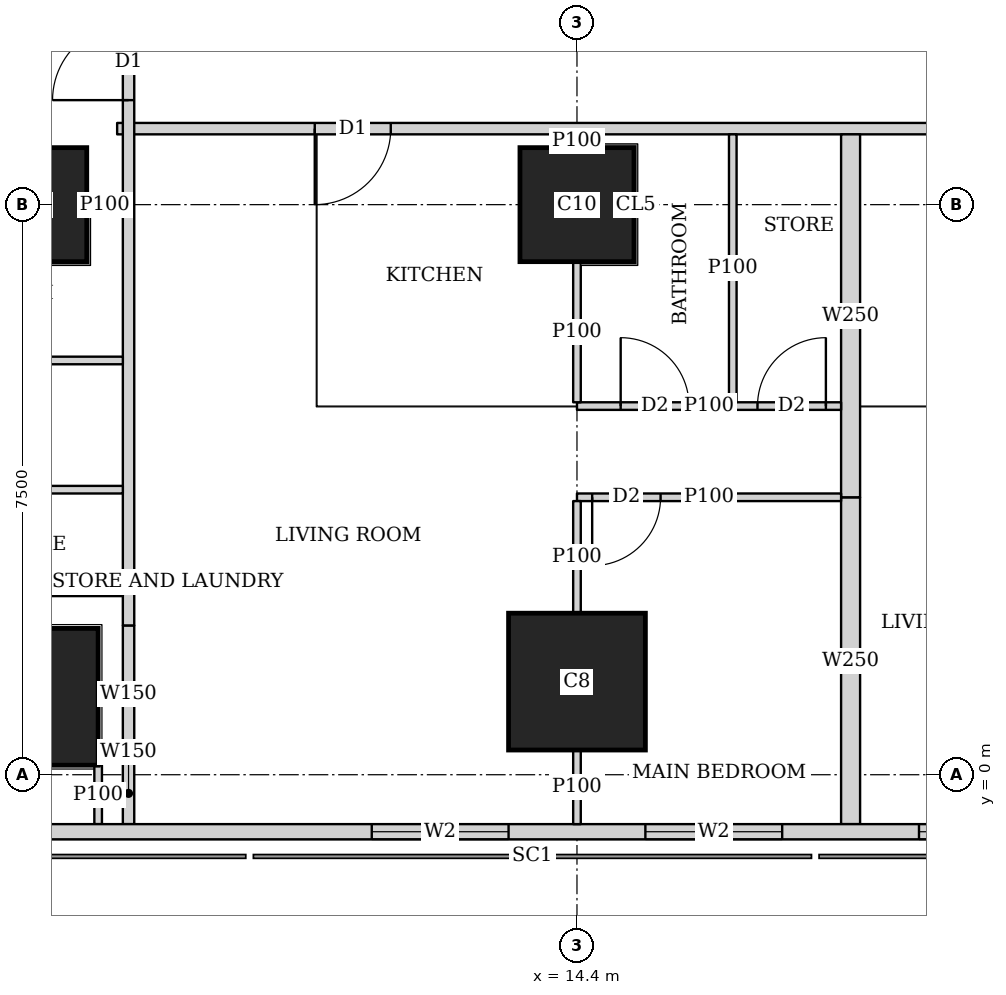
"""IFC4 building model, lengths in metres.
Left out: names, types, materials, properties, quantities, classifications, styles, units other than length and angle.
Written with IfcOpenShell. Run it as: python <this file> out.ifc"""

import sys

from ifc_helpers import new_model, si_unit, direction, frame, frame_2d, origin, origin_2d, place, context, subcontext, project, spatial, rectangle, extrude, element, fill, save


model = new_model("IFC4")
c1 = context("Model", 3, precision=1e-05, world=origin(), true_north=direction((0.0, 1.0)))
c2 = subcontext(c1, "Body", "Model", "MODEL_VIEW")
j1 = project(units=[si_unit("LENGTHUNIT", "METRE"), si_unit("PLANEANGLEUNIT", "RADIAN")], contexts=[c1])
p1 = place(None, origin())
s1 = spatial("IfcSite", under=j1, at=p1, CompositionType="ELEMENT")
p2 = place(p1, origin())
s2 = spatial("IfcBuilding", under=s1, at=p2, CompositionType="ELEMENT")
p3 = place(p2, frame((0.0, 0.0, 139.55)))
s3 = spatial("IfcBuildingStorey", under=s2, at=p3, CompositionType="ELEMENT", Elevation=139.55)
for number, where, z_axis, x_axis in (
    (1, (7.2, 1.025, 0.0), (0.0, 0.0, 1.0), (1.0, 0.0, 0.0)),
    (2, (14.4, 1.225, 0.0), (0.0, 0.0, 1.0), (1.0, 0.0, 0.0)),
):
    element("IfcColumn", number, at=place(p3, frame(where, z_axis=z_axis, x_axis=x_axis)), inside=s3, PredefinedType="COLUMN", context=c2, shape_type="SweptSolid", body=[
        extrude(rectangle(XDim=1.8, YDim=1.8, at=origin_2d()), origin(), (0.0, 0.0, 1.0), 3.75),
    ])
for number, where, z_axis, x_axis in (
    (3, (7.2, 7.5, 0.0), (0.0, 0.0, 1.0), (1.0, 0.0, 0.0)),
    (4, (14.4, 7.5, 0.0), (0.0, 0.0, 1.0), (1.0, 0.0, 0.0)),
):
    element("IfcColumn", number, at=place(p3, frame(where, z_axis=z_axis, x_axis=x_axis)), inside=s3, PredefinedType="COLUMN", context=c2, shape_type="SweptSolid", body=[
        extrude(rectangle(XDim=1.5, YDim=1.5, at=origin_2d()), origin(), (0.0, 0.0, 1.0), 3.75),
    ])
p4 = place(p3, frame((2.163, -0.75, 0.0), z_axis=(0.0, 0.0, 1.0), x_axis=(1.0, 0.0, 0.0)))
e5 = element("IfcWall", 5, at=p4, inside=s3, PredefinedType="SOLIDWALL", context=c2, shape_type="SweptSolid", body=[
    extrude(rectangle(XDim=45.628, YDim=0.2, at=frame_2d((22.814, 0.0))), origin(), (0.0, 0.0, 1.0), 3.5),
])
p5 = place(p4, frame((9.537, 0.0, 0.9)))
e6 = element("IfcOpeningElement", 6, at=p5, cuts=e5, PredefinedType="OPENING", context=c2, shape_type="SweptSolid", body=[
    extrude(rectangle(XDim=1.8, YDim=1.5, at=frame_2d((0.9, 0.75))), frame((0.0, 0.11, 0.0), z_axis=(0.0, -1.0, 0.0), x_axis=(1.0, 0.0, 0.0)), (0.0, 0.0, 1.0), 0.22),
])
p6 = place(p4, frame((13.137, 0.0, 0.9)))
e7 = element("IfcOpeningElement", 7, at=p6, cuts=e5, PredefinedType="OPENING", context=c2, shape_type="SweptSolid", body=[
    extrude(rectangle(XDim=1.8, YDim=1.5, at=frame_2d((0.9, 0.75))), frame((0.0, 0.11, 0.0), z_axis=(0.0, -1.0, 0.0), x_axis=(1.0, 0.0, 0.0)), (0.0, 0.0, 1.0), 0.22),
])
p7 = place(p4, frame((16.737, 0.0, 0.9)))
e8 = element("IfcOpeningElement", 8, at=p7, cuts=e5, PredefinedType="OPENING", context=c2, shape_type="SweptSolid", body=[
    extrude(rectangle(XDim=1.8, YDim=1.5, at=frame_2d((0.9, 0.75))), frame((0.0, 0.11, 0.0), z_axis=(0.0, -1.0, 0.0), x_axis=(1.0, 0.0, 0.0)), (0.0, 0.0, 1.0), 0.22),
])
p8 = place(p4, frame((20.337, 0.0, 0.9)))
e9 = element("IfcOpeningElement", 9, at=p8, cuts=e5, PredefinedType="OPENING", context=c2, shape_type="SweptSolid", body=[
    extrude(rectangle(XDim=1.8, YDim=1.5, at=frame_2d((0.9, 0.75))), frame((0.0, 0.11, 0.0), z_axis=(0.0, -1.0, 0.0), x_axis=(1.0, 0.0, 0.0)), (0.0, 0.0, 1.0), 0.22),
])
p9 = place(p4, frame((23.937, 0.0, 0.9)))
e10 = element("IfcOpeningElement", 10, at=p9, cuts=e5, PredefinedType="OPENING", context=c2, shape_type="SweptSolid", body=[
    extrude(rectangle(XDim=1.8, YDim=1.5, at=frame_2d((0.9, 0.75))), frame((0.0, 0.11, 0.0), z_axis=(0.0, -1.0, 0.0), x_axis=(1.0, 0.0, 0.0)), (0.0, 0.0, 1.0), 0.22),
])
p10 = place(p4, frame((27.537, 0.0, 0.9)))
e11 = element("IfcOpeningElement", 11, at=p10, cuts=e5, PredefinedType="OPENING", context=c2, shape_type="SweptSolid", body=[
    extrude(rectangle(XDim=1.8, YDim=1.5, at=frame_2d((0.9, 0.75))), frame((0.0, 0.11, 0.0), z_axis=(0.0, -1.0, 0.0), x_axis=(1.0, 0.0, 0.0)), (0.0, 0.0, 1.0), 0.22),
])
p11 = place(p4, frame((31.137, 0.0, 0.9)))
e12 = element("IfcOpeningElement", 12, at=p11, cuts=e5, PredefinedType="OPENING", context=c2, shape_type="SweptSolid", body=[
    extrude(rectangle(XDim=1.8, YDim=1.5, at=frame_2d((0.9, 0.75))), frame((0.0, 0.11, 0.0), z_axis=(0.0, -1.0, 0.0), x_axis=(1.0, 0.0, 0.0)), (0.0, 0.0, 1.0), 0.22),
])
p12 = place(p4, frame((34.737, 0.0, 0.9)))
e13 = element("IfcOpeningElement", 13, at=p12, cuts=e5, PredefinedType="OPENING", context=c2, shape_type="SweptSolid", body=[
    extrude(rectangle(XDim=1.8, YDim=1.5, at=frame_2d((0.9, 0.75))), frame((0.0, 0.11, 0.0), z_axis=(0.0, -1.0, 0.0), x_axis=(1.0, 0.0, 0.0)), (0.0, 0.0, 1.0), 0.22),
])
p13 = place(p3, frame((8.5, -0.65, 0.0), z_axis=(0.0, 0.0, 1.0), x_axis=(0.0, 1.0, 0.0)))
e14 = element("IfcWall", 14, at=p13, inside=s3, PredefinedType="SOLIDWALL", context=c2, shape_type="SweptSolid", body=[
    extrude(rectangle(XDim=0.809, YDim=0.15, at=frame_2d((0.404, 0.0))), origin(), (0.0, 0.0, 1.0), 3.5),
])
p14 = place(p3, frame((8.5, 0.159, 0.0), z_axis=(0.0, 0.0, 1.0), x_axis=(0.0, 1.0, 0.0)))
e15 = element("IfcWall", 15, at=p14, inside=s3, PredefinedType="SOLIDWALL", context=c2, shape_type="SweptSolid", body=[
    extrude(rectangle(XDim=1.805, YDim=0.15, at=frame_2d((0.903, 0.0))), origin(), (0.0, 0.0, 1.0), 2.1),
])
p15 = place(p3, frame((8.5, 1.964, 0.0), z_axis=(0.0, 0.0, 1.0), x_axis=(0.0, 1.0, 0.0)))
e16 = element("IfcWall", 16, at=p15, inside=s3, PredefinedType="SOLIDWALL", context=c2, shape_type="SweptSolid", body=[
    extrude(rectangle(XDim=41.097, YDim=0.15, at=frame_2d((20.548, 0.0))), origin(), (0.0, 0.0, 1.0), 3.5),
])
p16 = place(p15, frame((6.911, 0.0, 0.0)))
e17 = element("IfcOpeningElement", 17, at=p16, cuts=e16, PredefinedType="OPENING", context=c2, shape_type="SweptSolid", body=[
    extrude(rectangle(XDim=1.0, YDim=2.1, at=frame_2d((0.5, 1.05))), frame((0.0, 0.085, 0.0), z_axis=(0.0, -1.0, 0.0), x_axis=(1.0, 0.0, 0.0)), (0.0, 0.0, 1.0), 0.17),
])
p17 = place(p15, frame((10.661, 0.0, 0.0)))
e18 = element("IfcOpeningElement", 18, at=p17, cuts=e16, PredefinedType="OPENING", context=c2, shape_type="SweptSolid", body=[
    extrude(rectangle(XDim=1.0, YDim=2.1, at=frame_2d((0.5, 1.05))), frame((0.0, 0.085, 0.0), z_axis=(0.0, -1.0, 0.0), x_axis=(1.0, 0.0, 0.0)), (0.0, 0.0, 1.0), 0.17),
])
p18 = place(p15, frame((25.661, 0.0, 0.0)))
e19 = element("IfcOpeningElement", 19, at=p18, cuts=e16, PredefinedType="OPENING", context=c2, shape_type="SweptSolid", body=[
    extrude(rectangle(XDim=1.0, YDim=2.1, at=frame_2d((0.5, 1.05))), frame((0.0, 0.085, 0.0), z_axis=(0.0, -1.0, 0.0), x_axis=(1.0, 0.0, 0.0)), (0.0, 0.0, 1.0), 0.17),
])
p19 = place(p15, frame((33.161, 0.0, 0.0)))
e20 = element("IfcOpeningElement", 20, at=p19, cuts=e16, PredefinedType="OPENING", context=c2, shape_type="SweptSolid", body=[
    extrude(rectangle(XDim=1.0, YDim=2.1, at=frame_2d((0.5, 1.05))), frame((0.0, 0.085, 0.0), z_axis=(0.0, -1.0, 0.0), x_axis=(1.0, 0.0, 0.0)), (0.0, 0.0, 1.0), 0.17),
])
p20 = place(p3, frame((40.053, 8.5, 0.0), z_axis=(0.0, 0.0, 1.0), x_axis=(-1.0, 0.0, 0.0)))
e21 = element("IfcWall", 21, at=p20, inside=s3, PredefinedType="SOLIDWALL", context=c2, shape_type="SweptSolid", body=[
    extrude(rectangle(XDim=31.703, YDim=0.15, at=frame_2d((15.852, 0.0))), origin(), (0.0, 0.0, 1.0), 3.5),
])
p21 = place(p20, frame((28.103, 0.0, 0.0)))
e22 = element("IfcOpeningElement", 22, at=p21, cuts=e21, PredefinedType="OPENING", context=c2, shape_type="SweptSolid", body=[
    extrude(rectangle(XDim=1.0, YDim=2.1, at=frame_2d((0.5, 1.05))), frame((0.0, 0.085, 0.0), z_axis=(0.0, -1.0, 0.0), x_axis=(1.0, 0.0, 0.0)), (0.0, 0.0, 1.0), 0.17),
])
p22 = place(p20, frame((19.853, 0.0, 0.0)))
e23 = element("IfcOpeningElement", 23, at=p22, cuts=e21, PredefinedType="OPENING", context=c2, shape_type="SweptSolid", body=[
    extrude(rectangle(XDim=1.0, YDim=2.1, at=frame_2d((0.5, 1.05))), frame((0.0, 0.085, 0.0), z_axis=(0.0, -1.0, 0.0), x_axis=(1.0, 0.0, 0.0)), (0.0, 0.0, 1.0), 0.17),
])
p23 = place(p20, frame((5.514, 0.0, 0.0)))
e24 = element("IfcOpeningElement", 24, at=p23, cuts=e21, PredefinedType="OPENING", context=c2, shape_type="SweptSolid", body=[
    extrude(rectangle(XDim=1.0, YDim=2.1, at=frame_2d((0.5, 1.05))), frame((0.0, 0.085, 0.0), z_axis=(0.0, -1.0, 0.0), x_axis=(1.0, 0.0, 0.0)), (0.0, 0.0, 1.0), 0.17),
])
p24 = place(p3, frame((8.1, 0.124, 0.0), z_axis=(0.0, 0.0, 1.0), x_axis=(0.0, -1.0, 0.0)))
e25 = element("IfcWall", 25, at=p24, inside=s3, PredefinedType="PARTITIONING", context=c2, shape_type="SweptSolid", body=[
    extrude(rectangle(XDim=0.774, YDim=0.1, at=frame_2d((0.387, 0.0))), origin(), (0.0, 0.0, 1.0), 3.5),
])
p25 = place(p3, frame((4.9, 3.75, 0.0), z_axis=(0.0, 0.0, 1.0), x_axis=(1.0, 0.0, 0.0)))
e26 = element("IfcWall", 26, at=p25, inside=s3, PredefinedType="PARTITIONING", context=c2, shape_type="SweptSolid", body=[
    extrude(rectangle(XDim=3.525, YDim=0.1, at=frame_2d((1.763, 0.0))), origin(), (0.0, 0.0, 1.0), 3.5),
])
p26 = place(p3, frame((7.951, 7.5, 0.0), z_axis=(0.0, 0.0, 1.0), x_axis=(1.0, 0.0, 0.0)))
e27 = element("IfcWall", 27, at=p26, inside=s3, PredefinedType="PARTITIONING", context=c2, shape_type="SweptSolid", body=[
    extrude(rectangle(XDim=0.474, YDim=0.1, at=frame_2d((0.237, 0.0))), origin(), (0.0, 0.0, 1.0), 3.5),
])
p27 = place(p3, frame((4.9, 5.45, 0.0), z_axis=(0.0, 0.0, 1.0), x_axis=(1.0, 0.0, 0.0)))
e28 = element("IfcWall", 28, at=p27, inside=s3, PredefinedType="PARTITIONING", context=c2, shape_type="SweptSolid", body=[
    extrude(rectangle(XDim=3.525, YDim=0.1, at=frame_2d((1.763, 0.0))), origin(), (0.0, 0.0, 1.0), 3.5),
])
p28 = place(p3, frame((17.875, 3.65, 0.0), z_axis=(0.0, 0.0, 1.0), x_axis=(-1.0, 0.0, 0.0)))
e29 = element("IfcWall", 29, at=p28, inside=s3, PredefinedType="PARTITIONING", context=c2, shape_type="SweptSolid", body=[
    extrude(rectangle(XDim=3.475, YDim=0.1, at=frame_2d((1.738, 0.0))), origin(), (0.0, 0.0, 1.0), 3.5),
])
p29 = place(p28, frame((2.375, 0.0, 0.0)))
e30 = element("IfcOpeningElement", 30, at=p29, cuts=e29, PredefinedType="OPENING", context=c2, shape_type="SweptSolid", body=[
    extrude(rectangle(XDim=0.9, YDim=2.1, at=frame_2d((0.45, 1.05))), frame((0.0, 0.06, 0.0), z_axis=(0.0, -1.0, 0.0), x_axis=(1.0, 0.0, 0.0)), (0.0, 0.0, 1.0), 0.12),
])
p30 = place(p3, frame((17.875, 4.85, 0.0), z_axis=(0.0, 0.0, 1.0), x_axis=(-1.0, 0.0, 0.0)))
e31 = element("IfcWall", 31, at=p30, inside=s3, PredefinedType="PARTITIONING", context=c2, shape_type="SweptSolid", body=[
    extrude(rectangle(XDim=3.475, YDim=0.1, at=frame_2d((1.738, 0.0))), origin(), (0.0, 0.0, 1.0), 3.5),
])
p31 = place(p30, frame((2.0, 0.0, 0.0)))
e32 = element("IfcOpeningElement", 32, at=p31, cuts=e31, PredefinedType="OPENING", context=c2, shape_type="SweptSolid", body=[
    extrude(rectangle(XDim=0.9, YDim=2.1, at=frame_2d((0.45, 1.05))), frame((0.0, 0.06, 0.0), z_axis=(0.0, -1.0, 0.0), x_axis=(1.0, 0.0, 0.0)), (0.0, 0.0, 1.0), 0.12),
])
p32 = place(p30, frame((0.2, 0.0, 0.0)))
e33 = element("IfcOpeningElement", 33, at=p32, cuts=e31, PredefinedType="OPENING", context=c2, shape_type="SweptSolid", body=[
    extrude(rectangle(XDim=0.9, YDim=2.1, at=frame_2d((0.45, 1.05))), frame((0.0, 0.06, 0.0), z_axis=(0.0, -1.0, 0.0), x_axis=(1.0, 0.0, 0.0)), (0.0, 0.0, 1.0), 0.12),
])
p33 = place(p3, frame((14.4, -0.65, 0.0), z_axis=(0.0, 0.0, 1.0), x_axis=(0.0, 1.0, 0.0)))
e34 = element("IfcWall", 34, at=p33, inside=s3, PredefinedType="PARTITIONING", context=c2, shape_type="SweptSolid", body=[
    extrude(rectangle(XDim=0.974, YDim=0.1, at=frame_2d((0.487, 0.0))), origin(), (0.0, 0.0, 1.0), 3.5),
])
p34 = place(p3, frame((14.4, 2.126, 0.0), z_axis=(0.0, 0.0, 1.0), x_axis=(0.0, 1.0, 0.0)))
e35 = element("IfcWall", 35, at=p34, inside=s3, PredefinedType="PARTITIONING", context=c2, shape_type="SweptSolid", body=[
    extrude(rectangle(XDim=1.474, YDim=0.1, at=frame_2d((0.737, 0.0))), origin(), (0.0, 0.0, 1.0), 3.5),
])
p35 = place(p3, frame((14.4, 4.9, 0.0), z_axis=(0.0, 0.0, 1.0), x_axis=(0.0, 1.0, 0.0)))
e36 = element("IfcWall", 36, at=p35, inside=s3, PredefinedType="PARTITIONING", context=c2, shape_type="SweptSolid", body=[
    extrude(rectangle(XDim=1.849, YDim=0.1, at=frame_2d((0.925, 0.0))), origin(), (0.0, 0.0, 1.0), 3.5),
])
p36 = place(p3, frame((14.4, 8.251, 0.0), z_axis=(0.0, 0.0, 1.0), x_axis=(0.0, 1.0, 0.0)))
e37 = element("IfcWall", 37, at=p36, inside=s3, PredefinedType="PARTITIONING", context=c2, shape_type="SweptSolid", body=[
    extrude(rectangle(XDim=0.174, YDim=0.1, at=frame_2d((0.087, 0.0))), origin(), (0.0, 0.0, 1.0), 3.5),
])
p37 = place(p3, frame((16.45, 4.9, 0.0), z_axis=(0.0, 0.0, 1.0), x_axis=(0.0, 1.0, 0.0)))
e38 = element("IfcWall", 38, at=p37, inside=s3, PredefinedType="PARTITIONING", context=c2, shape_type="SweptSolid", body=[
    extrude(rectangle(XDim=3.525, YDim=0.1, at=frame_2d((1.763, 0.0))), origin(), (0.0, 0.0, 1.0), 3.5),
])
p38 = place(p3, frame((18.0, -0.65, 0.0), z_axis=(0.0, 0.0, 1.0), x_axis=(0.0, 1.0, 0.0)))
e39 = element("IfcWall", 39, at=p38, inside=s3, PredefinedType="SOLIDWALL", context=c2, shape_type="SweptSolid", body=[
    extrude(rectangle(XDim=4.3, YDim=0.25, at=frame_2d((2.15, 0.0))), origin(), (0.0, 0.0, 1.0), 2.1),
])
p39 = place(p3, frame((18.0, 3.65, 0.0), z_axis=(0.0, 0.0, 1.0), x_axis=(0.0, 1.0, 0.0)))
e40 = element("IfcWall", 40, at=p39, inside=s3, PredefinedType="SOLIDWALL", context=c2, shape_type="SweptSolid", body=[
    extrude(rectangle(XDim=4.775, YDim=0.25, at=frame_2d((2.388, 0.0))), origin(), (0.0, 0.0, 1.0), 3.5),
])
p40 = place(p3, frame((5.467, 2.4, 0.0), z_axis=(0.0, 0.0, 1.0), x_axis=(1.0, 0.0, 0.0)))
e41 = element("IfcWall", 41, at=p40, inside=s3, PredefinedType="PARTITIONING", context=c2, shape_type="SweptSolid", body=[
    extrude(rectangle(XDim=2.958, YDim=0.1, at=frame_2d((1.479, 0.0))), origin(), (0.0, 0.0, 1.0), 3.5),
])
p41 = place(p40, frame((0.108, 0.0, 0.0)))
e42 = element("IfcOpeningElement", 42, at=p41, cuts=e41, PredefinedType="OPENING", context=c2, shape_type="SweptSolid", body=[
    extrude(rectangle(XDim=0.9, YDim=2.1, at=frame_2d((0.45, 1.05))), frame((0.0, 0.06, 0.0), z_axis=(0.0, -1.0, 0.0), x_axis=(1.0, 0.0, 0.0)), (0.0, 0.0, 1.0), 0.12),
])
p42 = place(p5, origin())
e43 = element("IfcWindow", 43, at=p42, inside=s3, PartitioningType="SINGLE_PANEL", PredefinedType="WINDOW", context=c2, shape_type="SweptSolid", body=[
    extrude(rectangle(XDim=1.8, YDim=1.5, at=frame_2d((0.9, 0.75))), frame((0.0, 0.03, 0.0), z_axis=(0.0, -1.0, 0.0), x_axis=(1.0, 0.0, 0.0)), (0.0, 0.0, 1.0), 0.06),
])
fill(e6, e43)
p43 = place(p6, origin())
e44 = element("IfcWindow", 44, at=p43, inside=s3, PartitioningType="SINGLE_PANEL", PredefinedType="WINDOW", context=c2, shape_type="SweptSolid", body=[
    extrude(rectangle(XDim=1.8, YDim=1.5, at=frame_2d((0.9, 0.75))), frame((0.0, 0.03, 0.0), z_axis=(0.0, -1.0, 0.0), x_axis=(1.0, 0.0, 0.0)), (0.0, 0.0, 1.0), 0.06),
])
fill(e7, e44)
p44 = place(p7, origin())
e45 = element("IfcWindow", 45, at=p44, inside=s3, PartitioningType="SINGLE_PANEL", PredefinedType="WINDOW", context=c2, shape_type="SweptSolid", body=[
    extrude(rectangle(XDim=1.8, YDim=1.5, at=frame_2d((0.9, 0.75))), frame((0.0, 0.03, 0.0), z_axis=(0.0, -1.0, 0.0), x_axis=(1.0, 0.0, 0.0)), (0.0, 0.0, 1.0), 0.06),
])
fill(e8, e45)
p45 = place(p16, origin())
e46 = element("IfcDoor", 46, at=p45, inside=s3, OperationType="SINGLE_SWING_LEFT", PredefinedType="DOOR", context=c2, shape_type="SweptSolid", body=[
    extrude(rectangle(XDim=1.0, YDim=2.1, at=frame_2d((0.5, 1.05))), frame((0.0, 0.025, 0.0), z_axis=(0.0, -1.0, 0.0), x_axis=(1.0, 0.0, 0.0)), (0.0, 0.0, 1.0), 0.05),
])
fill(e17, e46)
p46 = place(p29, origin())
e47 = element("IfcDoor", 47, at=p46, inside=s3, OperationType="SINGLE_SWING_RIGHT", PredefinedType="DOOR", context=c2, shape_type="SweptSolid", body=[
    extrude(rectangle(XDim=0.9, YDim=2.1, at=frame_2d((0.45, 1.05))), frame((0.0, 0.025, 0.0), z_axis=(0.0, -1.0, 0.0), x_axis=(1.0, 0.0, 0.0)), (0.0, 0.0, 1.0), 0.05),
])
fill(e30, e47)
p47 = place(p31, origin())
e48 = element("IfcDoor", 48, at=p47, inside=s3, OperationType="SINGLE_SWING_LEFT", PredefinedType="DOOR", context=c2, shape_type="SweptSolid", body=[
    extrude(rectangle(XDim=0.9, YDim=2.1, at=frame_2d((0.45, 1.05))), frame((0.0, 0.025, 0.0), z_axis=(0.0, -1.0, 0.0), x_axis=(1.0, 0.0, 0.0)), (0.0, 0.0, 1.0), 0.05),
])
fill(e32, e48)
p48 = place(p32, origin())
e49 = element("IfcDoor", 49, at=p48, inside=s3, OperationType="SINGLE_SWING_RIGHT", PredefinedType="DOOR", context=c2, shape_type="SweptSolid", body=[
    extrude(rectangle(XDim=0.9, YDim=2.1, at=frame_2d((0.45, 1.05))), frame((0.0, 0.025, 0.0), z_axis=(0.0, -1.0, 0.0), x_axis=(1.0, 0.0, 0.0)), (0.0, 0.0, 1.0), 0.05),
])
fill(e33, e49)
p49 = place(p21, origin())
e50 = element("IfcDoor", 50, at=p49, inside=s3, OperationType="SINGLE_SWING_RIGHT", PredefinedType="DOOR", context=c2, shape_type="SweptSolid", body=[
    extrude(rectangle(XDim=1.0, YDim=2.1, at=frame_2d((0.5, 1.05))), frame((0.0, 0.025, 0.0), z_axis=(0.0, -1.0, 0.0), x_axis=(1.0, 0.0, 0.0)), (0.0, 0.0, 1.0), 0.05),
])
fill(e22, e50)
save(model, sys.argv[1])
